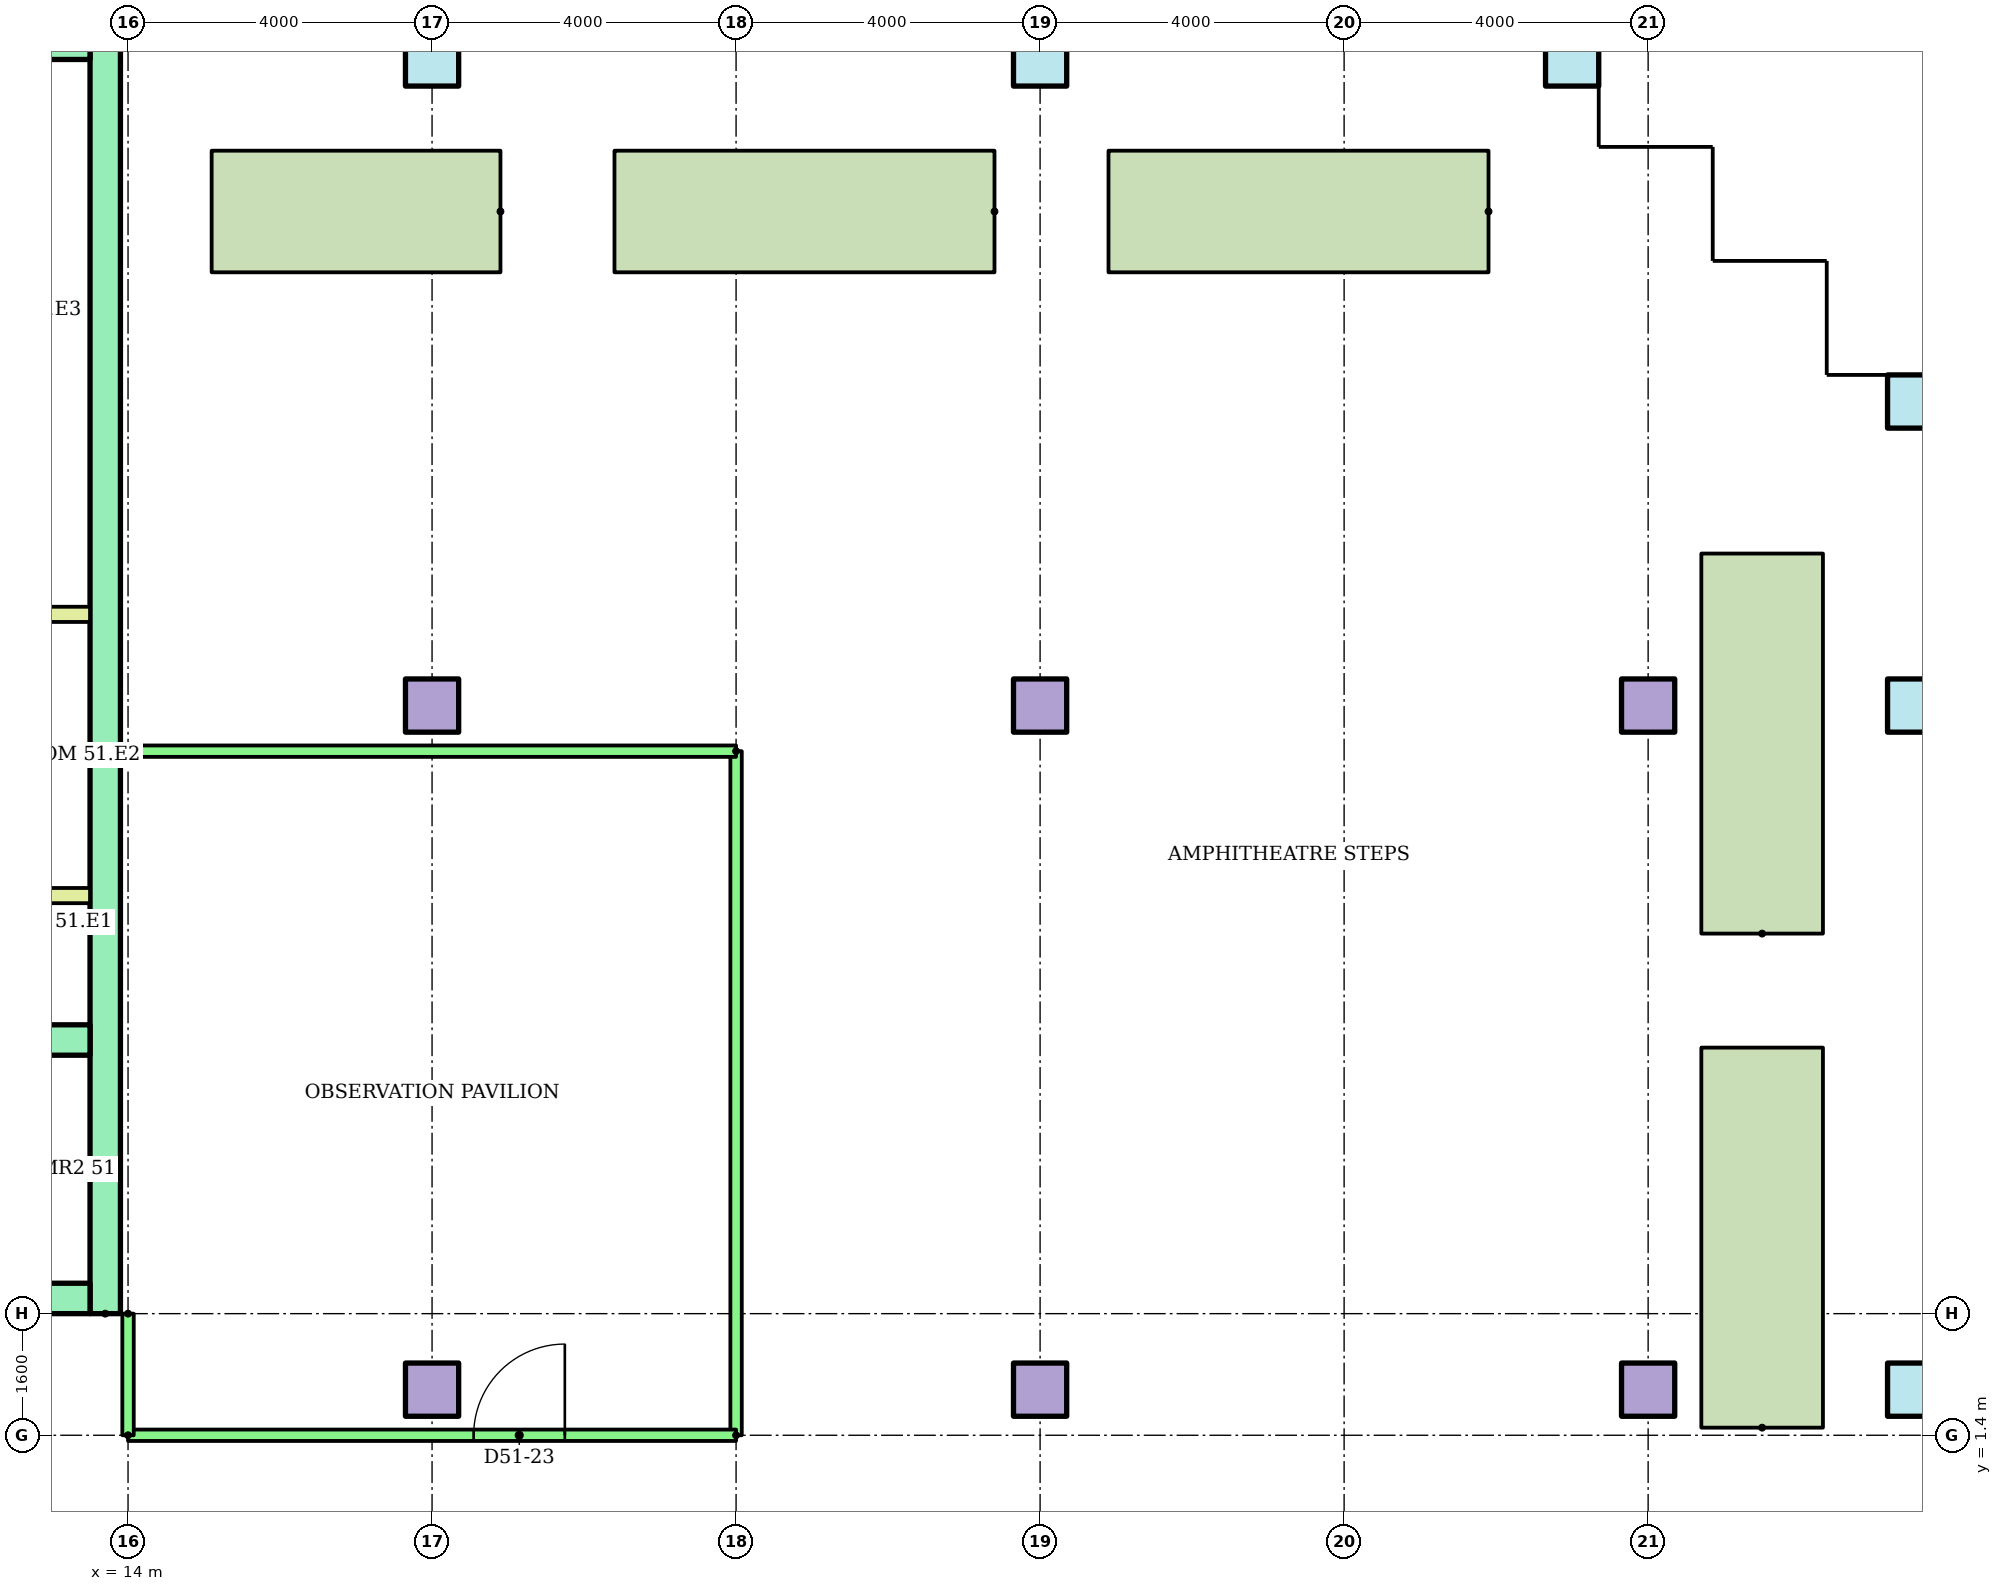
"""IFC4 building model, lengths in metres.
Left out: names, types, materials, properties, quantities, classifications, styles, units other than length and angle.
Written with IfcOpenShell. Run it as: python <this file> out.ifc"""

import sys

from ifc_helpers import new_model, si_unit, direction, frame, frame_2d, origin, origin_2d, place, context, subcontext, project, spatial, rectangle, hollow_rectangle, extrude, element, fill, save


model = new_model("IFC4")
c1 = context("Model", 3, precision=1e-05, world=origin(), true_north=direction((0.0, 1.0)))
c2 = subcontext(c1, "Body", "Model", "MODEL_VIEW")
j1 = project(units=[si_unit("LENGTHUNIT", "METRE"), si_unit("PLANEANGLEUNIT", "RADIAN")], contexts=[c1])
p1 = place(None, origin())
s1 = spatial("IfcSite", under=j1, at=p1, CompositionType="ELEMENT")
p2 = place(p1, origin())
s2 = spatial("IfcBuilding", under=s1, at=p2, CompositionType="ELEMENT")
p3 = place(p2, frame((0.0, 0.0, 194.1)))
s3 = spatial("IfcBuildingStorey", under=s2, at=p3, CompositionType="ELEMENT", Elevation=194.1)
for number, where in (
    (1, (18.0, 2.0, 0.0)),
    (2, (26.0, 2.0, 0.0)),
):
    element("IfcColumn", number, at=place(p3, frame(where)), inside=s3, PredefinedType="COLUMN", context=c2, shape_type="SweptSolid", body=[
        extrude(rectangle(XDim=0.7, YDim=0.7, at=origin_2d()), origin(), (0.0, 0.0, 1.0), 9.6),
    ])
p4 = place(p3, frame((34.0, 2.0, 0.0)))
e3 = element("IfcColumn", 3, at=p4, inside=s3, PredefinedType="COLUMN", context=c2, shape_type="SweptSolid", body=[
    extrude(rectangle(XDim=0.7, YDim=0.7, at=origin_2d()), origin(), (0.0, 0.0, 1.0), 8.8),
])
p5 = place(p3, frame((37.5, 2.0, 0.0)))
e4 = element("IfcColumn", 4, at=p5, inside=s3, PredefinedType="COLUMN", context=c2, shape_type="SweptSolid", body=[
    extrude(hollow_rectangle(XDim=0.7, YDim=0.7, WallThickness=0.036, at=origin_2d()), origin(), (0.0, 0.0, 1.0), 9.25),
])
for number, where in (
    (5, (18.0, 11.0, 0.0)),
    (6, (26.0, 11.0, 0.0)),
):
    element("IfcColumn", number, at=place(p3, frame(where)), inside=s3, PredefinedType="COLUMN", context=c2, shape_type="SweptSolid", body=[
        extrude(rectangle(XDim=0.7, YDim=0.7, at=origin_2d()), origin(), (0.0, 0.0, 1.0), 9.6),
    ])
p6 = place(p3, frame((34.0, 11.0, 0.0)))
e7 = element("IfcColumn", 7, at=p6, inside=s3, PredefinedType="COLUMN", context=c2, shape_type="SweptSolid", body=[
    extrude(rectangle(XDim=0.7, YDim=0.7, at=origin_2d()), origin(), (0.0, 0.0, 1.0), 8.8),
])
for number, where in (
    (8, (37.5, 11.0, 0.0)),
    (9, (37.5, 15.0, 0.0)),
):
    element("IfcColumn", number, at=place(p3, frame(where)), inside=s3, PredefinedType="COLUMN", context=c2, shape_type="SweptSolid", body=[
        extrude(hollow_rectangle(XDim=0.7, YDim=0.7, WallThickness=0.036, at=origin_2d()), origin(), (0.0, 0.0, 1.0), 9.25),
    ])
p7 = place(p3, frame((18.0, 19.5, 0.0)))
e10 = element("IfcColumn", 10, at=p7, inside=s3, PredefinedType="COLUMN", context=c2, shape_type="SweptSolid", body=[
    extrude(hollow_rectangle(XDim=0.7, YDim=0.7, WallThickness=0.036, at=origin_2d()), origin(), (0.0, 0.0, 1.0), 9.6),
])
p8 = place(p3, frame((26.0, 19.5, 0.0)))
e11 = element("IfcColumn", 11, at=p8, inside=s3, PredefinedType="COLUMN", context=c2, shape_type="SweptSolid", body=[
    extrude(hollow_rectangle(XDim=0.7, YDim=0.7, WallThickness=0.036, at=origin_2d()), origin(), (0.0, 0.0, 1.0), 8.8),
])
p9 = place(p3, frame((33.0, 19.5, 0.0)))
e12 = element("IfcColumn", 12, at=p9, inside=s3, PredefinedType="COLUMN", context=c2, shape_type="SweptSolid", body=[
    extrude(hollow_rectangle(XDim=0.7, YDim=0.7, WallThickness=0.036, at=origin_2d()), origin(), (0.0, 0.0, 1.0), 9.25),
])
for number, where, z_axis, x_axis in (
    (13, (31.9, 17.5, 0.0), (0.0, 0.0, 1.0), (-1.0, 0.0, 0.0)),
    (14, (25.4, 17.5, 0.0), (0.0, 0.0, 1.0), (-1.0, 0.0, 0.0)),
):
    element("IfcWall", number, at=place(p3, frame(where, z_axis=z_axis, x_axis=x_axis)), inside=s3, PredefinedType="STANDARD", context=c2, shape_type="SweptSolid", body=[
        extrude(rectangle(XDim=5.0, YDim=1.6, at=frame_2d((2.5, 0.0))), origin(), (0.0, 0.0, 1.0), 0.8),
    ])
p10 = place(p3, frame((18.9, 17.5, 0.0), z_axis=(0.0, 0.0, 1.0), x_axis=(-1.0, 0.0, 0.0)))
e15 = element("IfcWall", 15, at=p10, inside=s3, PredefinedType="STANDARD", context=c2, shape_type="SweptSolid", body=[
    extrude(rectangle(XDim=3.8, YDim=1.6, at=frame_2d((1.9, 0.0))), origin(), (0.0, 0.0, 1.0), 0.8),
])
for number, where, z_axis, x_axis in (
    (16, (35.5, 1.5, 0.0), (0.0, 0.0, 1.0), (0.0, 1.0, 0.0)),
    (17, (35.5, 8.0, 0.0), (0.0, 0.0, 1.0), (0.0, 1.0, 0.0)),
):
    element("IfcWall", number, at=place(p3, frame(where, z_axis=z_axis, x_axis=x_axis)), inside=s3, PredefinedType="STANDARD", context=c2, shape_type="SweptSolid", body=[
        extrude(rectangle(XDim=5.0, YDim=1.6, at=frame_2d((2.5, 0.0))), origin(), (0.0, 0.0, 1.0), 0.8),
    ])
p11 = place(p3, frame((13.7, 3.0, 0.0), z_axis=(0.0, 0.0, 1.0), x_axis=(0.0, 1.0, 0.0)))
e18 = element("IfcWall", 18, at=p11, inside=s3, PredefinedType="SHEAR", context=c2, shape_type="SweptSolid", body=[
    extrude(rectangle(XDim=17.0, YDim=0.4, at=frame_2d((8.5, 0.0))), origin(), (0.0, 0.0, 1.0), 8.8),
])
p12 = place(p3, frame((-13.5, 19.7, 0.0)))
e19 = element("IfcWall", 19, at=p12, inside=s3, PredefinedType="SHEAR", context=c2, shape_type="SweptSolid", body=[
    extrude(rectangle(XDim=27.0, YDim=0.4, at=frame_2d((13.5, 0.0))), origin(), (0.0, 0.0, 1.0), 8.8),
])
p13 = place(p3, frame((-13.5, 3.2, 0.0)))
e20 = element("IfcWall", 20, at=p13, inside=s3, PredefinedType="SHEAR", context=c2, shape_type="SweptSolid", body=[
    extrude(rectangle(XDim=27.0, YDim=0.4, at=frame_2d((13.5, 0.0))), origin(), (0.0, 0.0, 1.0), 8.8),
])
p14 = place(p13, frame((22.083, 0.0, 0.0)))
e21 = element("IfcOpeningElement", 21, at=p14, cuts=e20, PredefinedType="OPENING", context=c2, shape_type="SweptSolid", body=[
    extrude(rectangle(XDim=1.1, YDim=2.1, at=frame_2d((0.55, 1.05))), frame((0.0, 0.21, 0.0), z_axis=(0.0, -1.0, 0.0), x_axis=(1.0, 0.0, 0.0)), (0.0, 0.0, 1.0), 0.42),
])
p15 = place(p13, frame((25.128, 0.0, 0.0)))
e22 = element("IfcOpeningElement", 22, at=p15, cuts=e20, PredefinedType="OPENING", context=c2, shape_type="SweptSolid", body=[
    extrude(rectangle(XDim=1.1, YDim=2.1, at=frame_2d((0.55, 1.05))), frame((0.0, 0.21, 0.0), z_axis=(0.0, -1.0, 0.0), x_axis=(1.0, 0.0, 0.0)), (0.0, 0.0, 1.0), 0.42),
])
p16 = place(p13, frame((12.6, 0.0, 0.0)))
e23 = element("IfcOpeningElement", 23, at=p16, cuts=e20, PredefinedType="OPENING", context=c2, shape_type="SweptSolid", body=[
    extrude(rectangle(XDim=1.8, YDim=2.1, at=frame_2d((0.9, 1.05))), frame((0.0, 0.21, 0.0), z_axis=(0.0, -1.0, 0.0), x_axis=(1.0, 0.0, 0.0)), (0.0, 0.0, 1.0), 0.42),
])
p17 = place(p3, frame((1.522, 6.6, 0.0)))
e24 = element("IfcWall", 24, at=p17, inside=s3, PredefinedType="SHEAR", context=c2, shape_type="SweptSolid", body=[
    extrude(rectangle(XDim=11.978, YDim=0.4, at=frame_2d((5.989, 0.0))), origin(), (0.0, 0.0, 1.0), 8.8),
])
p18 = place(p17, frame((1.022, 0.0, 0.0)))
e25 = element("IfcOpeningElement", 25, at=p18, cuts=e24, PredefinedType="OPENING", context=c2, shape_type="SweptSolid", body=[
    extrude(rectangle(XDim=1.0, YDim=2.1, at=frame_2d((0.5, 1.05))), frame((0.0, 0.21, 0.0), z_axis=(0.0, -1.0, 0.0), x_axis=(1.0, 0.0, 0.0)), (0.0, 0.0, 1.0), 0.42),
])
p19 = place(p17, frame((4.067, 0.0, 0.0)))
e26 = element("IfcOpeningElement", 26, at=p19, cuts=e24, PredefinedType="OPENING", context=c2, shape_type="SweptSolid", body=[
    extrude(rectangle(XDim=1.0, YDim=2.1, at=frame_2d((0.5, 1.05))), frame((0.0, 0.21, 0.0), z_axis=(0.0, -1.0, 0.0), x_axis=(1.0, 0.0, 0.0)), (0.0, 0.0, 1.0), 0.42),
])
for number, where in (
    (27, (9.6, 8.5, 0.0)),
    (28, (9.6, 12.2, 0.0)),
):
    element("IfcWall", number, at=place(p3, frame(where)), inside=s3, PredefinedType="PARTITIONING", context=c2, shape_type="SweptSolid", body=[
        extrude(rectangle(XDim=3.9, YDim=0.2, at=frame_2d((1.95, 0.0))), origin(), (0.0, 0.0, 1.0), 8.8),
    ])
p20 = place(p3, frame((22.0, 1.4, 0.0), z_axis=(0.0, 0.0, 1.0), x_axis=(0.0, 1.0, 0.0)))
e29 = element("IfcWall", 29, at=p20, inside=s3, PredefinedType="PARTITIONING", context=c2, shape_type="SweptSolid", body=[
    extrude(rectangle(XDim=9.0, YDim=0.15, at=frame_2d((4.5, 0.0))), origin(), (0.0, 0.0, 1.0), 8.8),
])
p21 = place(p3, frame((22.0, 10.4, 0.0), z_axis=(0.0, 0.0, 1.0), x_axis=(-1.0, 0.0, 0.0)))
e30 = element("IfcWall", 30, at=p21, inside=s3, PredefinedType="PARTITIONING", context=c2, shape_type="SweptSolid", body=[
    extrude(rectangle(XDim=8.0, YDim=0.15, at=frame_2d((4.0, 0.0))), origin(), (0.0, 0.0, 1.0), 8.8),
])
p22 = place(p3, frame((14.0, 1.4, 0.0)))
e31 = element("IfcWall", 31, at=p22, inside=s3, PredefinedType="PARTITIONING", context=c2, shape_type="SweptSolid", body=[
    extrude(rectangle(XDim=8.0, YDim=0.15, at=frame_2d((4.0, 0.0))), origin(), (0.0, 0.0, 1.0), 8.8),
])
p23 = place(p22, frame((4.547, 0.0, 0.0)))
e32 = element("IfcOpeningElement", 32, at=p23, cuts=e31, PredefinedType="OPENING", context=c2, shape_type="SweptSolid", body=[
    extrude(rectangle(XDim=1.2, YDim=2.1, at=frame_2d((0.6, 1.05))), frame((0.0, 0.085, 0.0), z_axis=(0.0, -1.0, 0.0), x_axis=(1.0, 0.0, 0.0)), (0.0, 0.0, 1.0), 0.17),
])
p24 = place(p3, frame((14.0, 3.0, 0.0), z_axis=(0.0, 0.0, 1.0), x_axis=(0.0, -1.0, 0.0)))
e33 = element("IfcWall", 33, at=p24, inside=s3, PredefinedType="PARTITIONING", context=c2, shape_type="SweptSolid", body=[
    extrude(rectangle(XDim=1.6, YDim=0.15, at=frame_2d((0.8, 0.0))), origin(), (0.0, 0.0, 1.0), 8.8),
])
p25 = place(p23, origin())
e34 = element("IfcDoor", 34, at=p25, inside=s3, OperationType="SINGLE_SWING_RIGHT", PredefinedType="DOOR", context=c2, shape_type="SweptSolid", body=[
    extrude(rectangle(XDim=1.2, YDim=2.1, at=frame_2d((0.6, 1.05))), frame((0.0, 0.025, 0.0), z_axis=(0.0, -1.0, 0.0), x_axis=(1.0, 0.0, 0.0)), (0.0, 0.0, 1.0), 0.05),
])
fill(e32, e34)
save(model, sys.argv[1])
